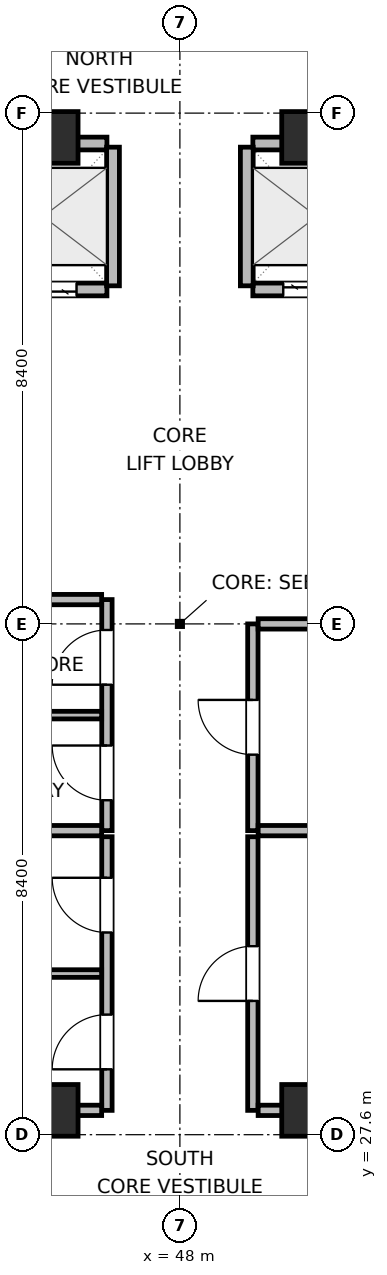
"""IFC4 building model, lengths in metres.
Left out: names, types, materials, properties, quantities, classifications, styles, units other than length and angle.
Written with IfcOpenShell. Run it as: python <this file> out.ifc"""

import sys

from ifc_helpers import new_model, si_unit, direction, frame, frame_2d, origin, origin_2d, place, context, subcontext, project, spatial, rectangle, extrude, element, fill, save


model = new_model("IFC4")
c1 = context("Model", 3, precision=1e-05, world=origin(), true_north=direction((0.0, 1.0)))
c2 = subcontext(c1, "Body", "Model", "MODEL_VIEW")
j1 = project(units=[si_unit("LENGTHUNIT", "METRE"), si_unit("PLANEANGLEUNIT", "RADIAN")], contexts=[c1])
p1 = place(None, origin())
s1 = spatial("IfcSite", under=j1, at=p1, CompositionType="ELEMENT")
p2 = place(p1, origin())
s2 = spatial("IfcBuilding", under=s1, at=p2, CompositionType="ELEMENT")
p3 = place(p2, frame((0.0, 0.0, 190.2)))
s3 = spatial("IfcBuildingStorey", under=s2, at=p3, CompositionType="ELEMENT", Elevation=190.2)
for number, where, z_axis, x_axis in (
    (1, (45.9, 28.0, 0.0), (0.0, 0.0, 1.0), (1.0, 0.0, 0.0)),
    (2, (50.1, 28.0, 0.0), (0.0, 0.0, 1.0), (1.0, 0.0, 0.0)),
    (3, (45.9, 44.0, 0.0), (0.0, 0.0, 1.0), (1.0, 0.0, 0.0)),
    (4, (50.1, 44.0, 0.0), (0.0, 0.0, 1.0), (1.0, 0.0, 0.0)),
):
    element("IfcColumn", number, at=place(p3, frame(where, z_axis=z_axis, x_axis=x_axis)), inside=s3, PredefinedType="COLUMN", context=c2, shape_type="SweptSolid", body=[
        extrude(rectangle(XDim=0.85, YDim=0.85, at=origin_2d()), origin(), (0.0, 0.0, 1.0), 3.9),
    ])
p4 = place(p3, frame((44.7, 41.5, 0.0), z_axis=(0.0, 0.0, 1.0), x_axis=(1.0, 0.0, 0.0)))
e5 = element("IfcWall", 5, at=p4, inside=s3, PredefinedType="PARTITIONING", context=c2, shape_type="SweptSolid", body=[
    extrude(rectangle(XDim=2.1, YDim=0.21, at=frame_2d((1.05, 0.0))), origin(), (0.0, 0.0, 1.0), 3.68),
])
p5 = place(p4, frame((0.5, 0.0, 0.0)))
e6 = element("IfcOpeningElement", 6, at=p5, cuts=e5, PredefinedType="OPENING", context=c2, shape_type="SweptSolid", body=[
    extrude(rectangle(XDim=1.1, YDim=2.04, at=frame_2d((0.55, 1.02))), frame((0.0, 0.115, 0.0), z_axis=(0.0, -1.0, 0.0), x_axis=(1.0, 0.0, 0.0)), (0.0, 0.0, 1.0), 0.23),
])
p6 = place(p3, frame((44.7, 43.9, 0.0), z_axis=(0.0, 0.0, 1.0), x_axis=(1.0, 0.0, 0.0)))
e7 = element("IfcWall", 7, at=p6, inside=s3, PredefinedType="PARTITIONING", context=c2, shape_type="SweptSolid", body=[
    extrude(rectangle(XDim=2.1, YDim=0.21, at=frame_2d((1.05, 0.0))), origin(), (0.0, 0.0, 1.0), 2.765),
])
p7 = place(p3, frame((46.9, 41.56, 0.0), z_axis=(0.0, 0.0, 1.0), x_axis=(0.0, 1.0, 0.0)))
e8 = element("IfcWall", 8, at=p7, inside=s3, PredefinedType="PARTITIONING", context=c2, shape_type="SweptSolid", body=[
    extrude(rectangle(XDim=2.28, YDim=0.21, at=frame_2d((1.14, 0.0))), origin(), (0.0, 0.0, 1.0), 3.68),
])
p8 = place(p3, frame((49.2, 41.5, 0.0), z_axis=(0.0, 0.0, 1.0), x_axis=(1.0, 0.0, 0.0)))
e9 = element("IfcWall", 9, at=p8, inside=s3, PredefinedType="PARTITIONING", context=c2, shape_type="SweptSolid", body=[
    extrude(rectangle(XDim=2.1, YDim=0.21, at=frame_2d((1.05, 0.0))), origin(), (0.0, 0.0, 1.0), 3.68),
])
p9 = place(p8, frame((0.5, 0.0, 0.0)))
e10 = element("IfcOpeningElement", 10, at=p9, cuts=e9, PredefinedType="OPENING", context=c2, shape_type="SweptSolid", body=[
    extrude(rectangle(XDim=1.1, YDim=2.04, at=frame_2d((0.55, 1.02))), frame((0.0, 0.115, 0.0), z_axis=(0.0, -1.0, 0.0), x_axis=(1.0, 0.0, 0.0)), (0.0, 0.0, 1.0), 0.23),
])
p10 = place(p3, frame((49.2, 43.9, 0.0), z_axis=(0.0, 0.0, 1.0), x_axis=(1.0, 0.0, 0.0)))
e11 = element("IfcWall", 11, at=p10, inside=s3, PredefinedType="PARTITIONING", context=c2, shape_type="SweptSolid", body=[
    extrude(rectangle(XDim=2.1, YDim=0.21, at=frame_2d((1.05, 0.0))), origin(), (0.0, 0.0, 1.0), 2.765),
])
p11 = place(p3, frame((49.1, 41.56, 0.0), z_axis=(0.0, 0.0, 1.0), x_axis=(0.0, 1.0, 0.0)))
e12 = element("IfcWall", 12, at=p11, inside=s3, PredefinedType="PARTITIONING", context=c2, shape_type="SweptSolid", body=[
    extrude(rectangle(XDim=2.28, YDim=0.21, at=frame_2d((1.14, 0.0))), origin(), (0.0, 0.0, 1.0), 3.68),
])
p12 = place(p3, frame((46.8, 32.6, 0.0), z_axis=(0.0, 0.0, 1.0), x_axis=(0.0, 1.0, 0.0)))
e13 = element("IfcWall", 13, at=p12, inside=s3, PredefinedType="PARTITIONING", context=c2, shape_type="SweptSolid", body=[
    extrude(rectangle(XDim=3.8, YDim=0.17, at=frame_2d((1.9, 0.0))), origin(), (0.0, 0.0, 1.0), 3.68),
])
p13 = place(p12, frame((0.5, 0.0, 0.0)))
e14 = element("IfcOpeningElement", 14, at=p13, cuts=e13, PredefinedType="OPENING", context=c2, shape_type="SweptSolid", body=[
    extrude(rectangle(XDim=0.9, YDim=2.02, at=frame_2d((0.45, 1.01))), frame((0.0, 0.095, 0.0), z_axis=(0.0, -1.0, 0.0), x_axis=(1.0, 0.0, 0.0)), (0.0, 0.0, 1.0), 0.19),
])
p14 = place(p12, frame((2.4, 0.0, 0.0)))
e15 = element("IfcOpeningElement", 15, at=p14, cuts=e13, PredefinedType="OPENING", context=c2, shape_type="SweptSolid", body=[
    extrude(rectangle(XDim=0.9, YDim=2.02, at=frame_2d((0.45, 1.01))), frame((0.0, 0.095, 0.0), z_axis=(0.0, -1.0, 0.0), x_axis=(1.0, 0.0, 0.0)), (0.0, 0.0, 1.0), 0.19),
])
for number, where, z_axis, x_axis in (
    (16, (43.8, 32.6, 0.0), (0.0, 0.0, 1.0), (1.0, 0.0, 0.0)),
    (17, (43.8, 36.4, 0.0), (0.0, 0.0, 1.0), (1.0, 0.0, 0.0)),
):
    element("IfcWall", number, at=place(p3, frame(where, z_axis=z_axis, x_axis=x_axis)), inside=s3, PredefinedType="PARTITIONING", context=c2, shape_type="SweptSolid", body=[
        extrude(rectangle(XDim=2.913, YDim=0.17, at=frame_2d((1.457, 0.0))), origin(), (0.0, 0.0, 1.0), 3.68),
    ])
p15 = place(p3, frame((43.8, 34.5, 0.0), z_axis=(0.0, 0.0, 1.0), x_axis=(1.0, 0.0, 0.0)))
e18 = element("IfcWall", 18, at=p15, inside=s3, PredefinedType="PARTITIONING", context=c2, shape_type="SweptSolid", body=[
    extrude(rectangle(XDim=2.913, YDim=0.125, at=frame_2d((1.457, 0.0))), origin(), (0.0, 0.0, 1.0), 3.68),
])
p16 = place(p3, frame((49.2, 32.6, 0.0), z_axis=(0.0, 0.0, 1.0), x_axis=(0.0, 1.0, 0.0)))
e19 = element("IfcWall", 19, at=p16, inside=s3, PredefinedType="PARTITIONING", context=c2, shape_type="SweptSolid", body=[
    extrude(rectangle(XDim=3.4, YDim=0.17, at=frame_2d((1.7, 0.0))), origin(), (0.0, 0.0, 1.0), 3.68),
])
p17 = place(p16, frame((1.25, 0.0, 0.0)))
e20 = element("IfcOpeningElement", 20, at=p17, cuts=e19, PredefinedType="OPENING", context=c2, shape_type="SweptSolid", body=[
    extrude(rectangle(XDim=0.9, YDim=2.02, at=frame_2d((0.45, 1.01))), frame((0.0, 0.095, 0.0), z_axis=(0.0, -1.0, 0.0), x_axis=(1.0, 0.0, 0.0)), (0.0, 0.0, 1.0), 0.19),
])
for number, where, z_axis, x_axis in (
    (21, (49.287, 32.6, 0.0), (0.0, 0.0, 1.0), (1.0, 0.0, 0.0)),
    (22, (49.287, 36.0, 0.0), (0.0, 0.0, 1.0), (1.0, 0.0, 0.0)),
):
    element("IfcWall", number, at=place(p3, frame(where, z_axis=z_axis, x_axis=x_axis)), inside=s3, PredefinedType="PARTITIONING", context=c2, shape_type="SweptSolid", body=[
        extrude(rectangle(XDim=2.913, YDim=0.17, at=frame_2d((1.457, 0.0))), origin(), (0.0, 0.0, 1.0), 3.68),
    ])
p18 = place(p3, frame((46.8, 28.0, 0.0), z_axis=(0.0, 0.0, 1.0), x_axis=(0.0, 1.0, 0.0)))
e23 = element("IfcWall", 23, at=p18, inside=s3, PredefinedType="PARTITIONING", context=c2, shape_type="SweptSolid", body=[
    extrude(rectangle(XDim=4.5, YDim=0.17, at=frame_2d((2.25, 0.0))), origin(), (0.0, 0.0, 1.0), 3.68),
])
p19 = place(p18, frame((0.675, 0.0, 0.0)))
e24 = element("IfcOpeningElement", 24, at=p19, cuts=e23, PredefinedType="OPENING", context=c2, shape_type="SweptSolid", body=[
    extrude(rectangle(XDim=0.9, YDim=2.02, at=frame_2d((0.45, 1.01))), frame((0.0, 0.095, 0.0), z_axis=(0.0, -1.0, 0.0), x_axis=(1.0, 0.0, 0.0)), (0.0, 0.0, 1.0), 0.19),
])
p20 = place(p18, frame((2.925, 0.0, 0.0)))
e25 = element("IfcOpeningElement", 25, at=p20, cuts=e23, PredefinedType="OPENING", context=c2, shape_type="SweptSolid", body=[
    extrude(rectangle(XDim=0.9, YDim=2.02, at=frame_2d((0.45, 1.01))), frame((0.0, 0.095, 0.0), z_axis=(0.0, -1.0, 0.0), x_axis=(1.0, 0.0, 0.0)), (0.0, 0.0, 1.0), 0.19),
])
p21 = place(p3, frame((42.5, 28.0, 0.0), z_axis=(0.0, 0.0, 1.0), x_axis=(1.0, 0.0, 0.0)))
e26 = element("IfcWall", 26, at=p21, inside=s3, PredefinedType="PARTITIONING", context=c2, shape_type="SweptSolid", body=[
    extrude(rectangle(XDim=4.213, YDim=0.17, at=frame_2d((2.106, 0.0))), origin(), (0.0, 0.0, 1.0), 2.765),
])
p22 = place(p3, frame((42.5, 30.25, 0.0), z_axis=(0.0, 0.0, 1.0), x_axis=(1.0, 0.0, 0.0)))
e27 = element("IfcWall", 27, at=p22, inside=s3, PredefinedType="PARTITIONING", context=c2, shape_type="SweptSolid", body=[
    extrude(rectangle(XDim=4.213, YDim=0.125, at=frame_2d((2.106, 0.0))), origin(), (0.0, 0.0, 1.0), 3.68),
])
p23 = place(p3, frame((49.2, 28.0, 0.0), z_axis=(0.0, 0.0, 1.0), x_axis=(0.0, 1.0, 0.0)))
e28 = element("IfcWall", 28, at=p23, inside=s3, PredefinedType="PARTITIONING", context=c2, shape_type="SweptSolid", body=[
    extrude(rectangle(XDim=4.5, YDim=0.17, at=frame_2d((2.25, 0.0))), origin(), (0.0, 0.0, 1.0), 3.68),
])
p24 = place(p23, frame((1.8, 0.0, 0.0)))
e29 = element("IfcOpeningElement", 29, at=p24, cuts=e28, PredefinedType="OPENING", context=c2, shape_type="SweptSolid", body=[
    extrude(rectangle(XDim=0.9, YDim=2.02, at=frame_2d((0.45, 1.01))), frame((0.0, 0.095, 0.0), z_axis=(0.0, -1.0, 0.0), x_axis=(1.0, 0.0, 0.0)), (0.0, 0.0, 1.0), 0.19),
])
p25 = place(p3, frame((49.287, 28.0, 0.0), z_axis=(0.0, 0.0, 1.0), x_axis=(1.0, 0.0, 0.0)))
e30 = element("IfcWall", 30, at=p25, inside=s3, PredefinedType="PARTITIONING", context=c2, shape_type="SweptSolid", body=[
    extrude(rectangle(XDim=4.213, YDim=0.17, at=frame_2d((2.106, 0.0))), origin(), (0.0, 0.0, 1.0), 2.765),
])
p26 = place(p5, origin())
e31 = element("IfcDoor", 31, at=p26, inside=s3, OperationType="DOUBLE_DOOR_SLIDING", PredefinedType="DOOR", context=c2, shape_type="SweptSolid", body=[
    extrude(rectangle(XDim=1.1, YDim=2.04, at=frame_2d((0.55, 1.02))), frame((0.0, 0.025, 0.0), z_axis=(0.0, -1.0, 0.0), x_axis=(1.0, 0.0, 0.0)), (0.0, 0.0, 1.0), 0.05),
])
fill(e6, e31)
p27 = place(p9, origin())
e32 = element("IfcDoor", 32, at=p27, inside=s3, OperationType="DOUBLE_DOOR_SLIDING", PredefinedType="DOOR", context=c2, shape_type="SweptSolid", body=[
    extrude(rectangle(XDim=1.1, YDim=2.04, at=frame_2d((0.55, 1.02))), frame((0.0, 0.025, 0.0), z_axis=(0.0, -1.0, 0.0), x_axis=(1.0, 0.0, 0.0)), (0.0, 0.0, 1.0), 0.05),
])
fill(e10, e32)
p28 = place(p13, origin())
e33 = element("IfcDoor", 33, at=p28, inside=s3, OperationType="SINGLE_SWING_RIGHT", PredefinedType="DOOR", context=c2, shape_type="SweptSolid", body=[
    extrude(rectangle(XDim=0.9, YDim=2.02, at=frame_2d((0.45, 1.01))), frame((0.0, 0.025, 0.0), z_axis=(0.0, -1.0, 0.0), x_axis=(1.0, 0.0, 0.0)), (0.0, 0.0, 1.0), 0.05),
])
fill(e14, e33)
p29 = place(p14, origin())
e34 = element("IfcDoor", 34, at=p29, inside=s3, OperationType="SINGLE_SWING_LEFT", PredefinedType="DOOR", context=c2, shape_type="SweptSolid", body=[
    extrude(rectangle(XDim=0.9, YDim=2.02, at=frame_2d((0.45, 1.01))), frame((0.0, 0.025, 0.0), z_axis=(0.0, -1.0, 0.0), x_axis=(1.0, 0.0, 0.0)), (0.0, 0.0, 1.0), 0.05),
])
fill(e15, e34)
p30 = place(p17, origin())
e35 = element("IfcDoor", 35, at=p30, inside=s3, OperationType="SINGLE_SWING_RIGHT", PredefinedType="DOOR", context=c2, shape_type="SweptSolid", body=[
    extrude(rectangle(XDim=0.9, YDim=2.02, at=frame_2d((0.45, 1.01))), frame((0.0, 0.025, 0.0), z_axis=(0.0, -1.0, 0.0), x_axis=(1.0, 0.0, 0.0)), (0.0, 0.0, 1.0), 0.05),
])
fill(e20, e35)
p31 = place(p19, origin())
e36 = element("IfcDoor", 36, at=p31, inside=s3, OperationType="SINGLE_SWING_LEFT", PredefinedType="DOOR", context=c2, shape_type="SweptSolid", body=[
    extrude(rectangle(XDim=0.9, YDim=2.02, at=frame_2d((0.45, 1.01))), frame((0.0, 0.025, 0.0), z_axis=(0.0, -1.0, 0.0), x_axis=(1.0, 0.0, 0.0)), (0.0, 0.0, 1.0), 0.05),
])
fill(e24, e36)
p32 = place(p20, origin())
e37 = element("IfcDoor", 37, at=p32, inside=s3, OperationType="SINGLE_SWING_RIGHT", PredefinedType="DOOR", context=c2, shape_type="SweptSolid", body=[
    extrude(rectangle(XDim=0.9, YDim=2.02, at=frame_2d((0.45, 1.01))), frame((0.0, 0.025, 0.0), z_axis=(0.0, -1.0, 0.0), x_axis=(1.0, 0.0, 0.0)), (0.0, 0.0, 1.0), 0.05),
])
fill(e25, e37)
p33 = place(p24, origin())
e38 = element("IfcDoor", 38, at=p33, inside=s3, OperationType="SINGLE_SWING_LEFT", PredefinedType="DOOR", context=c2, shape_type="SweptSolid", body=[
    extrude(rectangle(XDim=0.9, YDim=2.02, at=frame_2d((0.45, 1.01))), frame((0.0, 0.025, 0.0), z_axis=(0.0, -1.0, 0.0), x_axis=(1.0, 0.0, 0.0)), (0.0, 0.0, 1.0), 0.05),
])
fill(e29, e38)
save(model, sys.argv[1])
